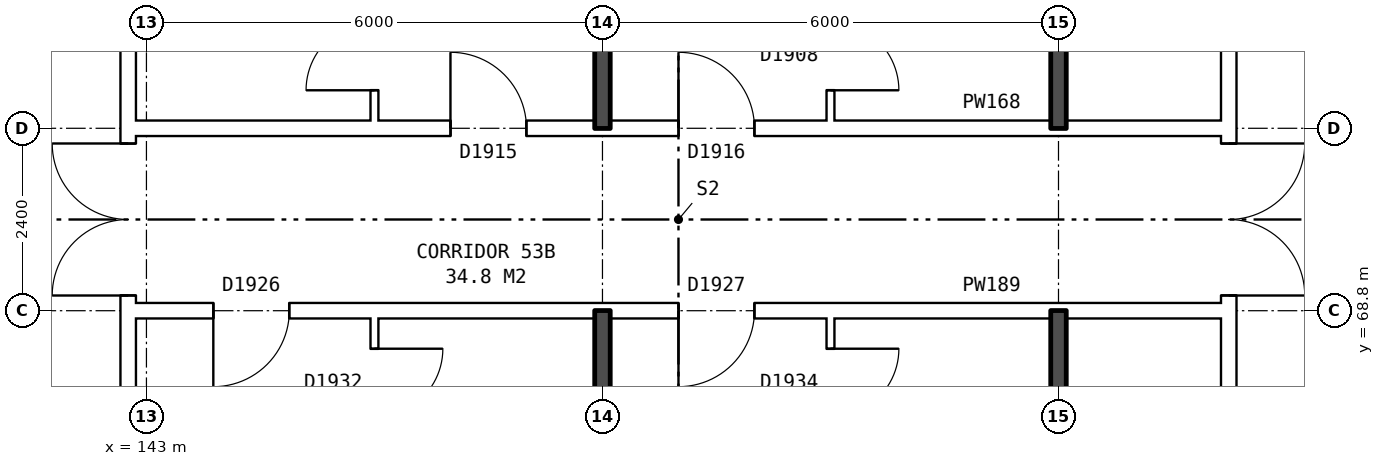
"""IFC4 building model, lengths in metres.
Left out: names, types, materials, properties, quantities, classifications, styles, units other than length and angle.
Written with IfcOpenShell. Run it as: python <this file> out.ifc"""

import sys

from ifc_helpers import new_model, si_unit, direction, frame, frame_2d, origin, place, context, subcontext, project, spatial, rectangle, extrude, element, fill, save


model = new_model("IFC4")
c1 = context("Model", 3, precision=1e-05, world=origin(), true_north=direction((0.0, 1.0)))
c2 = subcontext(c1, "Body", "Model", "MODEL_VIEW")
j1 = project(units=[si_unit("LENGTHUNIT", "METRE"), si_unit("PLANEANGLEUNIT", "RADIAN")], contexts=[c1])
p1 = place(None, origin())
s1 = spatial("IfcSite", under=j1, at=p1, CompositionType="ELEMENT")
p2 = place(p1, origin())
s2 = spatial("IfcBuilding", under=s1, at=p2, CompositionType="ELEMENT")
p3 = place(p2, frame((0.0, 0.0, 188.2)))
s3 = spatial("IfcBuildingStorey", under=s2, at=p3, CompositionType="ELEMENT", Elevation=188.2)
p4 = place(p3, frame((142.76, 63.9, 0.0), z_axis=(0.0, 0.0, 1.0), x_axis=(0.0, 1.0, 0.0)))
e1 = element("IfcWall", 1, at=p4, inside=s3, PredefinedType="PARTITIONING", context=c2, shape_type="SweptSolid", body=[
    extrude(rectangle(XDim=12.2, YDim=0.2, at=frame_2d((6.1, 0.0))), origin(), (0.0, 0.0, 1.0), 2.85),
])
p5 = place(p4, frame((5.1, 0.0, 0.0)))
e2 = element("IfcOpeningElement", 2, at=p5, cuts=e1, PredefinedType="OPENING", context=c2, shape_type="SweptSolid", body=[
    extrude(rectangle(XDim=2.0, YDim=2.1, at=frame_2d((1.0, 1.05))), frame((0.0, 0.11, 0.0), z_axis=(0.0, -1.0, 0.0), x_axis=(1.0, 0.0, 0.0)), (0.0, 0.0, 1.0), 0.22),
])
p6 = place(p3, frame((157.24, 63.9, 0.0), z_axis=(0.0, 0.0, 1.0), x_axis=(0.0, 1.0, 0.0)))
e3 = element("IfcWall", 3, at=p6, inside=s3, PredefinedType="PARTITIONING", context=c2, shape_type="SweptSolid", body=[
    extrude(rectangle(XDim=12.2, YDim=0.2, at=frame_2d((6.1, 0.0))), origin(), (0.0, 0.0, 1.0), 2.85),
])
p7 = place(p6, frame((5.1, 0.0, 0.0)))
e4 = element("IfcOpeningElement", 4, at=p7, cuts=e3, PredefinedType="OPENING", context=c2, shape_type="SweptSolid", body=[
    extrude(rectangle(XDim=2.0, YDim=2.1, at=frame_2d((1.0, 1.05))), frame((0.0, 0.11, 0.0), z_axis=(0.0, -1.0, 0.0), x_axis=(1.0, 0.0, 0.0)), (0.0, 0.0, 1.0), 0.22),
])
p8 = place(p3, frame((142.76, 68.8, 0.0), z_axis=(0.0, 0.0, 1.0), x_axis=(1.0, 0.0, 0.0)))
e5 = element("IfcWall", 5, at=p8, inside=s3, PredefinedType="PARTITIONING", context=c2, shape_type="SweptSolid", body=[
    extrude(rectangle(XDim=14.48, YDim=0.2, at=frame_2d((7.24, 0.0))), origin(), (0.0, 0.0, 1.0), 2.85),
])
p9 = place(p8, frame((1.12, 0.0, 0.0)))
e6 = element("IfcOpeningElement", 6, at=p9, cuts=e5, PredefinedType="OPENING", context=c2, shape_type="SweptSolid", body=[
    extrude(rectangle(XDim=1.0, YDim=2.1, at=frame_2d((0.5, 1.05))), frame((0.0, 0.11, 0.0), z_axis=(0.0, -1.0, 0.0), x_axis=(1.0, 0.0, 0.0)), (0.0, 0.0, 1.0), 0.22),
])
p10 = place(p8, frame((7.24, 0.0, 0.0)))
e7 = element("IfcOpeningElement", 7, at=p10, cuts=e5, PredefinedType="OPENING", context=c2, shape_type="SweptSolid", body=[
    extrude(rectangle(XDim=1.0, YDim=2.1, at=frame_2d((0.5, 1.05))), frame((0.0, 0.11, 0.0), z_axis=(0.0, -1.0, 0.0), x_axis=(1.0, 0.0, 0.0)), (0.0, 0.0, 1.0), 0.22),
])
p11 = place(p3, frame((142.76, 71.2, 0.0), z_axis=(0.0, 0.0, 1.0), x_axis=(1.0, 0.0, 0.0)))
e8 = element("IfcWall", 8, at=p11, inside=s3, PredefinedType="PARTITIONING", context=c2, shape_type="SweptSolid", body=[
    extrude(rectangle(XDim=14.48, YDim=0.2, at=frame_2d((7.24, 0.0))), origin(), (0.0, 0.0, 1.0), 2.85),
])
p12 = place(p11, frame((4.24, 0.0, 0.0)))
e9 = element("IfcOpeningElement", 9, at=p12, cuts=e8, PredefinedType="OPENING", context=c2, shape_type="SweptSolid", body=[
    extrude(rectangle(XDim=1.0, YDim=2.1, at=frame_2d((0.5, 1.05))), frame((0.0, 0.11, 0.0), z_axis=(0.0, -1.0, 0.0), x_axis=(1.0, 0.0, 0.0)), (0.0, 0.0, 1.0), 0.22),
])
p13 = place(p11, frame((7.24, 0.0, 0.0)))
e10 = element("IfcOpeningElement", 10, at=p13, cuts=e8, PredefinedType="OPENING", context=c2, shape_type="SweptSolid", body=[
    extrude(rectangle(XDim=1.0, YDim=2.1, at=frame_2d((0.5, 1.05))), frame((0.0, 0.11, 0.0), z_axis=(0.0, -1.0, 0.0), x_axis=(1.0, 0.0, 0.0)), (0.0, 0.0, 1.0), 0.22),
])
p14 = place(p3, frame((146.0, 54.36, 0.0), z_axis=(0.0, 0.0, 1.0), x_axis=(0.0, 1.0, 0.0)))
e11 = element("IfcWall", 11, at=p14, inside=s3, PredefinedType="PARTITIONING", context=c2, shape_type="SweptSolid", body=[
    extrude(rectangle(XDim=14.34, YDim=0.1, at=frame_2d((7.17, 0.0))), origin(), (0.0, 0.0, 1.0), 2.85),
])
p15 = place(p14, frame((4.2, 0.0, 0.0)))
e12 = element("IfcOpeningElement", 12, at=p15, cuts=e11, PredefinedType="OPENING", context=c2, shape_type="SweptSolid", body=[
    extrude(rectangle(XDim=0.9, YDim=2.1, at=frame_2d((0.45, 1.05))), frame((0.0, 0.06, 0.0), z_axis=(0.0, -1.0, 0.0), x_axis=(1.0, 0.0, 0.0)), (0.0, 0.0, 1.0), 0.12),
])
p16 = place(p14, frame((13.04, 0.0, 0.0)))
e13 = element("IfcOpeningElement", 13, at=p16, cuts=e11, PredefinedType="OPENING", context=c2, shape_type="SweptSolid", body=[
    extrude(rectangle(XDim=0.9, YDim=2.1, at=frame_2d((0.45, 1.05))), frame((0.0, 0.06, 0.0), z_axis=(0.0, -1.0, 0.0), x_axis=(1.0, 0.0, 0.0)), (0.0, 0.0, 1.0), 0.12),
])
p17 = place(p3, frame((146.0, 71.3, 0.0), z_axis=(0.0, 0.0, 1.0), x_axis=(0.0, 1.0, 0.0)))
e14 = element("IfcWall", 14, at=p17, inside=s3, PredefinedType="PARTITIONING", context=c2, shape_type="SweptSolid", body=[
    extrude(rectangle(XDim=14.34, YDim=0.1, at=frame_2d((7.17, 0.0))), origin(), (0.0, 0.0, 1.0), 2.85),
])
p18 = place(p17, frame((5.74, 0.0, 0.0)))
e15 = element("IfcOpeningElement", 15, at=p18, cuts=e14, PredefinedType="OPENING", context=c2, shape_type="SweptSolid", body=[
    extrude(rectangle(XDim=0.9, YDim=2.1, at=frame_2d((0.45, 1.05))), frame((0.0, 0.06, 0.0), z_axis=(0.0, -1.0, 0.0), x_axis=(1.0, 0.0, 0.0)), (0.0, 0.0, 1.0), 0.12),
])
p19 = place(p17, frame((0.4, 0.0, 0.0)))
e16 = element("IfcOpeningElement", 16, at=p19, cuts=e14, PredefinedType="OPENING", context=c2, shape_type="SweptSolid", body=[
    extrude(rectangle(XDim=0.9, YDim=2.1, at=frame_2d((0.45, 1.05))), frame((0.0, 0.06, 0.0), z_axis=(0.0, -1.0, 0.0), x_axis=(1.0, 0.0, 0.0)), (0.0, 0.0, 1.0), 0.12),
])
for number, where, z_axis, x_axis in (
    (17, (149.0, 54.36, 0.0), (0.0, 0.0, 1.0), (0.0, 1.0, 0.0)),
    (18, (149.0, 71.2, 0.0), (0.0, 0.0, 1.0), (0.0, 1.0, 0.0)),
):
    element("IfcWall", number, at=place(p3, frame(where, z_axis=z_axis, x_axis=x_axis)), inside=s3, PredefinedType="SOLIDWALL", context=c2, shape_type="SweptSolid", body=[
        extrude(rectangle(XDim=14.44, YDim=0.2, at=frame_2d((7.22, 0.0))), origin(), (0.0, 0.0, 1.0), 2.85),
    ])
p20 = place(p3, frame((152.0, 54.36, 0.0), z_axis=(0.0, 0.0, 1.0), x_axis=(0.0, 1.0, 0.0)))
e19 = element("IfcWall", 19, at=p20, inside=s3, PredefinedType="PARTITIONING", context=c2, shape_type="SweptSolid", body=[
    extrude(rectangle(XDim=14.34, YDim=0.1, at=frame_2d((7.17, 0.0))), origin(), (0.0, 0.0, 1.0), 2.85),
])
p21 = place(p20, frame((5.5, 0.0, 0.0)))
e20 = element("IfcOpeningElement", 20, at=p21, cuts=e19, PredefinedType="OPENING", context=c2, shape_type="SweptSolid", body=[
    extrude(rectangle(XDim=0.9, YDim=2.1, at=frame_2d((0.45, 1.05))), frame((0.0, 0.06, 0.0), z_axis=(0.0, -1.0, 0.0), x_axis=(1.0, 0.0, 0.0)), (0.0, 0.0, 1.0), 0.12),
])
p22 = place(p20, frame((13.04, 0.0, 0.0)))
e21 = element("IfcOpeningElement", 21, at=p22, cuts=e19, PredefinedType="OPENING", context=c2, shape_type="SweptSolid", body=[
    extrude(rectangle(XDim=0.9, YDim=2.1, at=frame_2d((0.45, 1.05))), frame((0.0, 0.06, 0.0), z_axis=(0.0, -1.0, 0.0), x_axis=(1.0, 0.0, 0.0)), (0.0, 0.0, 1.0), 0.12),
])
p23 = place(p3, frame((152.0, 71.3, 0.0), z_axis=(0.0, 0.0, 1.0), x_axis=(0.0, 1.0, 0.0)))
e22 = element("IfcWall", 22, at=p23, inside=s3, PredefinedType="PARTITIONING", context=c2, shape_type="SweptSolid", body=[
    extrude(rectangle(XDim=14.34, YDim=0.1, at=frame_2d((7.17, 0.0))), origin(), (0.0, 0.0, 1.0), 2.85),
])
p24 = place(p23, frame((7.94, 0.0, 0.0)))
e23 = element("IfcOpeningElement", 23, at=p24, cuts=e22, PredefinedType="OPENING", context=c2, shape_type="SweptSolid", body=[
    extrude(rectangle(XDim=0.9, YDim=2.1, at=frame_2d((0.45, 1.05))), frame((0.0, 0.06, 0.0), z_axis=(0.0, -1.0, 0.0), x_axis=(1.0, 0.0, 0.0)), (0.0, 0.0, 1.0), 0.12),
])
p25 = place(p23, frame((0.4, 0.0, 0.0)))
e24 = element("IfcOpeningElement", 24, at=p25, cuts=e22, PredefinedType="OPENING", context=c2, shape_type="SweptSolid", body=[
    extrude(rectangle(XDim=0.9, YDim=2.1, at=frame_2d((0.45, 1.05))), frame((0.0, 0.06, 0.0), z_axis=(0.0, -1.0, 0.0), x_axis=(1.0, 0.0, 0.0)), (0.0, 0.0, 1.0), 0.12),
])
for number, where, z_axis, x_axis in (
    (25, (155.0, 63.8, 0.0), (0.0, 0.0, 1.0), (0.0, 1.0, 0.0)),
    (26, (155.0, 71.2, 0.0), (0.0, 0.0, 1.0), (0.0, 1.0, 0.0)),
):
    element("IfcWall", number, at=place(p3, frame(where, z_axis=z_axis, x_axis=x_axis)), inside=s3, PredefinedType="SOLIDWALL", context=c2, shape_type="SweptSolid", body=[
        extrude(rectangle(XDim=5.0, YDim=0.2, at=frame_2d((2.5, 0.0))), origin(), (0.0, 0.0, 1.0), 2.85),
    ])
p26 = place(p5, origin())
e27 = element("IfcDoor", 27, at=p26, inside=s3, OperationType="DOUBLE_DOOR_SINGLE_SWING", PredefinedType="DOOR", context=c2, shape_type="SweptSolid", body=[
    extrude(rectangle(XDim=2.0, YDim=2.1, at=frame_2d((1.0, 1.05))), frame((0.0, 0.025, 0.0), z_axis=(0.0, -1.0, 0.0), x_axis=(1.0, 0.0, 0.0)), (0.0, 0.0, 1.0), 0.05),
])
fill(e2, e27)
p27 = place(p7, frame((2.0, 0.0, 0.0), z_axis=(0.0, 0.0, 1.0), x_axis=(-1.0, 0.0, 0.0)))
e28 = element("IfcDoor", 28, at=p27, inside=s3, OperationType="DOUBLE_DOOR_SINGLE_SWING", PredefinedType="DOOR", context=c2, shape_type="SweptSolid", body=[
    extrude(rectangle(XDim=2.0, YDim=2.1, at=frame_2d((1.0, 1.05))), frame((0.0, 0.025, 0.0), z_axis=(0.0, -1.0, 0.0), x_axis=(1.0, 0.0, 0.0)), (0.0, 0.0, 1.0), 0.05),
])
fill(e4, e28)
p28 = place(p9, frame((1.0, 0.0, 0.0), z_axis=(0.0, 0.0, 1.0), x_axis=(-1.0, 0.0, 0.0)))
e29 = element("IfcDoor", 29, at=p28, inside=s3, OperationType="SINGLE_SWING_RIGHT", PredefinedType="DOOR", context=c2, shape_type="SweptSolid", body=[
    extrude(rectangle(XDim=1.0, YDim=2.1, at=frame_2d((0.5, 1.05))), frame((0.0, 0.025, 0.0), z_axis=(0.0, -1.0, 0.0), x_axis=(1.0, 0.0, 0.0)), (0.0, 0.0, 1.0), 0.05),
])
fill(e6, e29)
p29 = place(p16, frame((0.9, 0.0, 0.0), z_axis=(0.0, 0.0, 1.0), x_axis=(-1.0, 0.0, 0.0)))
e30 = element("IfcDoor", 30, at=p29, inside=s3, OperationType="SINGLE_SWING_LEFT", PredefinedType="DOOR", context=c2, shape_type="SweptSolid", body=[
    extrude(rectangle(XDim=0.9, YDim=2.1, at=frame_2d((0.45, 1.05))), frame((0.0, 0.025, 0.0), z_axis=(0.0, -1.0, 0.0), x_axis=(1.0, 0.0, 0.0)), (0.0, 0.0, 1.0), 0.05),
])
fill(e13, e30)
p30 = place(p10, frame((1.0, 0.0, 0.0), z_axis=(0.0, 0.0, 1.0), x_axis=(-1.0, 0.0, 0.0)))
e31 = element("IfcDoor", 31, at=p30, inside=s3, OperationType="SINGLE_SWING_RIGHT", PredefinedType="DOOR", context=c2, shape_type="SweptSolid", body=[
    extrude(rectangle(XDim=1.0, YDim=2.1, at=frame_2d((0.5, 1.05))), frame((0.0, 0.025, 0.0), z_axis=(0.0, -1.0, 0.0), x_axis=(1.0, 0.0, 0.0)), (0.0, 0.0, 1.0), 0.05),
])
fill(e7, e31)
p31 = place(p22, frame((0.9, 0.0, 0.0), z_axis=(0.0, 0.0, 1.0), x_axis=(-1.0, 0.0, 0.0)))
e32 = element("IfcDoor", 32, at=p31, inside=s3, OperationType="SINGLE_SWING_LEFT", PredefinedType="DOOR", context=c2, shape_type="SweptSolid", body=[
    extrude(rectangle(XDim=0.9, YDim=2.1, at=frame_2d((0.45, 1.05))), frame((0.0, 0.025, 0.0), z_axis=(0.0, -1.0, 0.0), x_axis=(1.0, 0.0, 0.0)), (0.0, 0.0, 1.0), 0.05),
])
fill(e21, e32)
p32 = place(p12, origin())
e33 = element("IfcDoor", 33, at=p32, inside=s3, OperationType="SINGLE_SWING_LEFT", PredefinedType="DOOR", context=c2, shape_type="SweptSolid", body=[
    extrude(rectangle(XDim=1.0, YDim=2.1, at=frame_2d((0.5, 1.05))), frame((0.0, 0.025, 0.0), z_axis=(0.0, -1.0, 0.0), x_axis=(1.0, 0.0, 0.0)), (0.0, 0.0, 1.0), 0.05),
])
fill(e9, e33)
p33 = place(p19, origin())
e34 = element("IfcDoor", 34, at=p33, inside=s3, OperationType="SINGLE_SWING_LEFT", PredefinedType="DOOR", context=c2, shape_type="SweptSolid", body=[
    extrude(rectangle(XDim=0.9, YDim=2.1, at=frame_2d((0.45, 1.05))), frame((0.0, 0.025, 0.0), z_axis=(0.0, -1.0, 0.0), x_axis=(1.0, 0.0, 0.0)), (0.0, 0.0, 1.0), 0.05),
])
fill(e16, e34)
p34 = place(p13, origin())
e35 = element("IfcDoor", 35, at=p34, inside=s3, OperationType="SINGLE_SWING_LEFT", PredefinedType="DOOR", context=c2, shape_type="SweptSolid", body=[
    extrude(rectangle(XDim=1.0, YDim=2.1, at=frame_2d((0.5, 1.05))), frame((0.0, 0.025, 0.0), z_axis=(0.0, -1.0, 0.0), x_axis=(1.0, 0.0, 0.0)), (0.0, 0.0, 1.0), 0.05),
])
fill(e10, e35)
p35 = place(p25, frame((0.9, 0.0, 0.0), z_axis=(0.0, 0.0, 1.0), x_axis=(-1.0, 0.0, 0.0)))
e36 = element("IfcDoor", 36, at=p35, inside=s3, OperationType="SINGLE_SWING_RIGHT", PredefinedType="DOOR", context=c2, shape_type="SweptSolid", body=[
    extrude(rectangle(XDim=0.9, YDim=2.1, at=frame_2d((0.45, 1.05))), frame((0.0, 0.025, 0.0), z_axis=(0.0, -1.0, 0.0), x_axis=(1.0, 0.0, 0.0)), (0.0, 0.0, 1.0), 0.05),
])
fill(e24, e36)
save(model, sys.argv[1])
